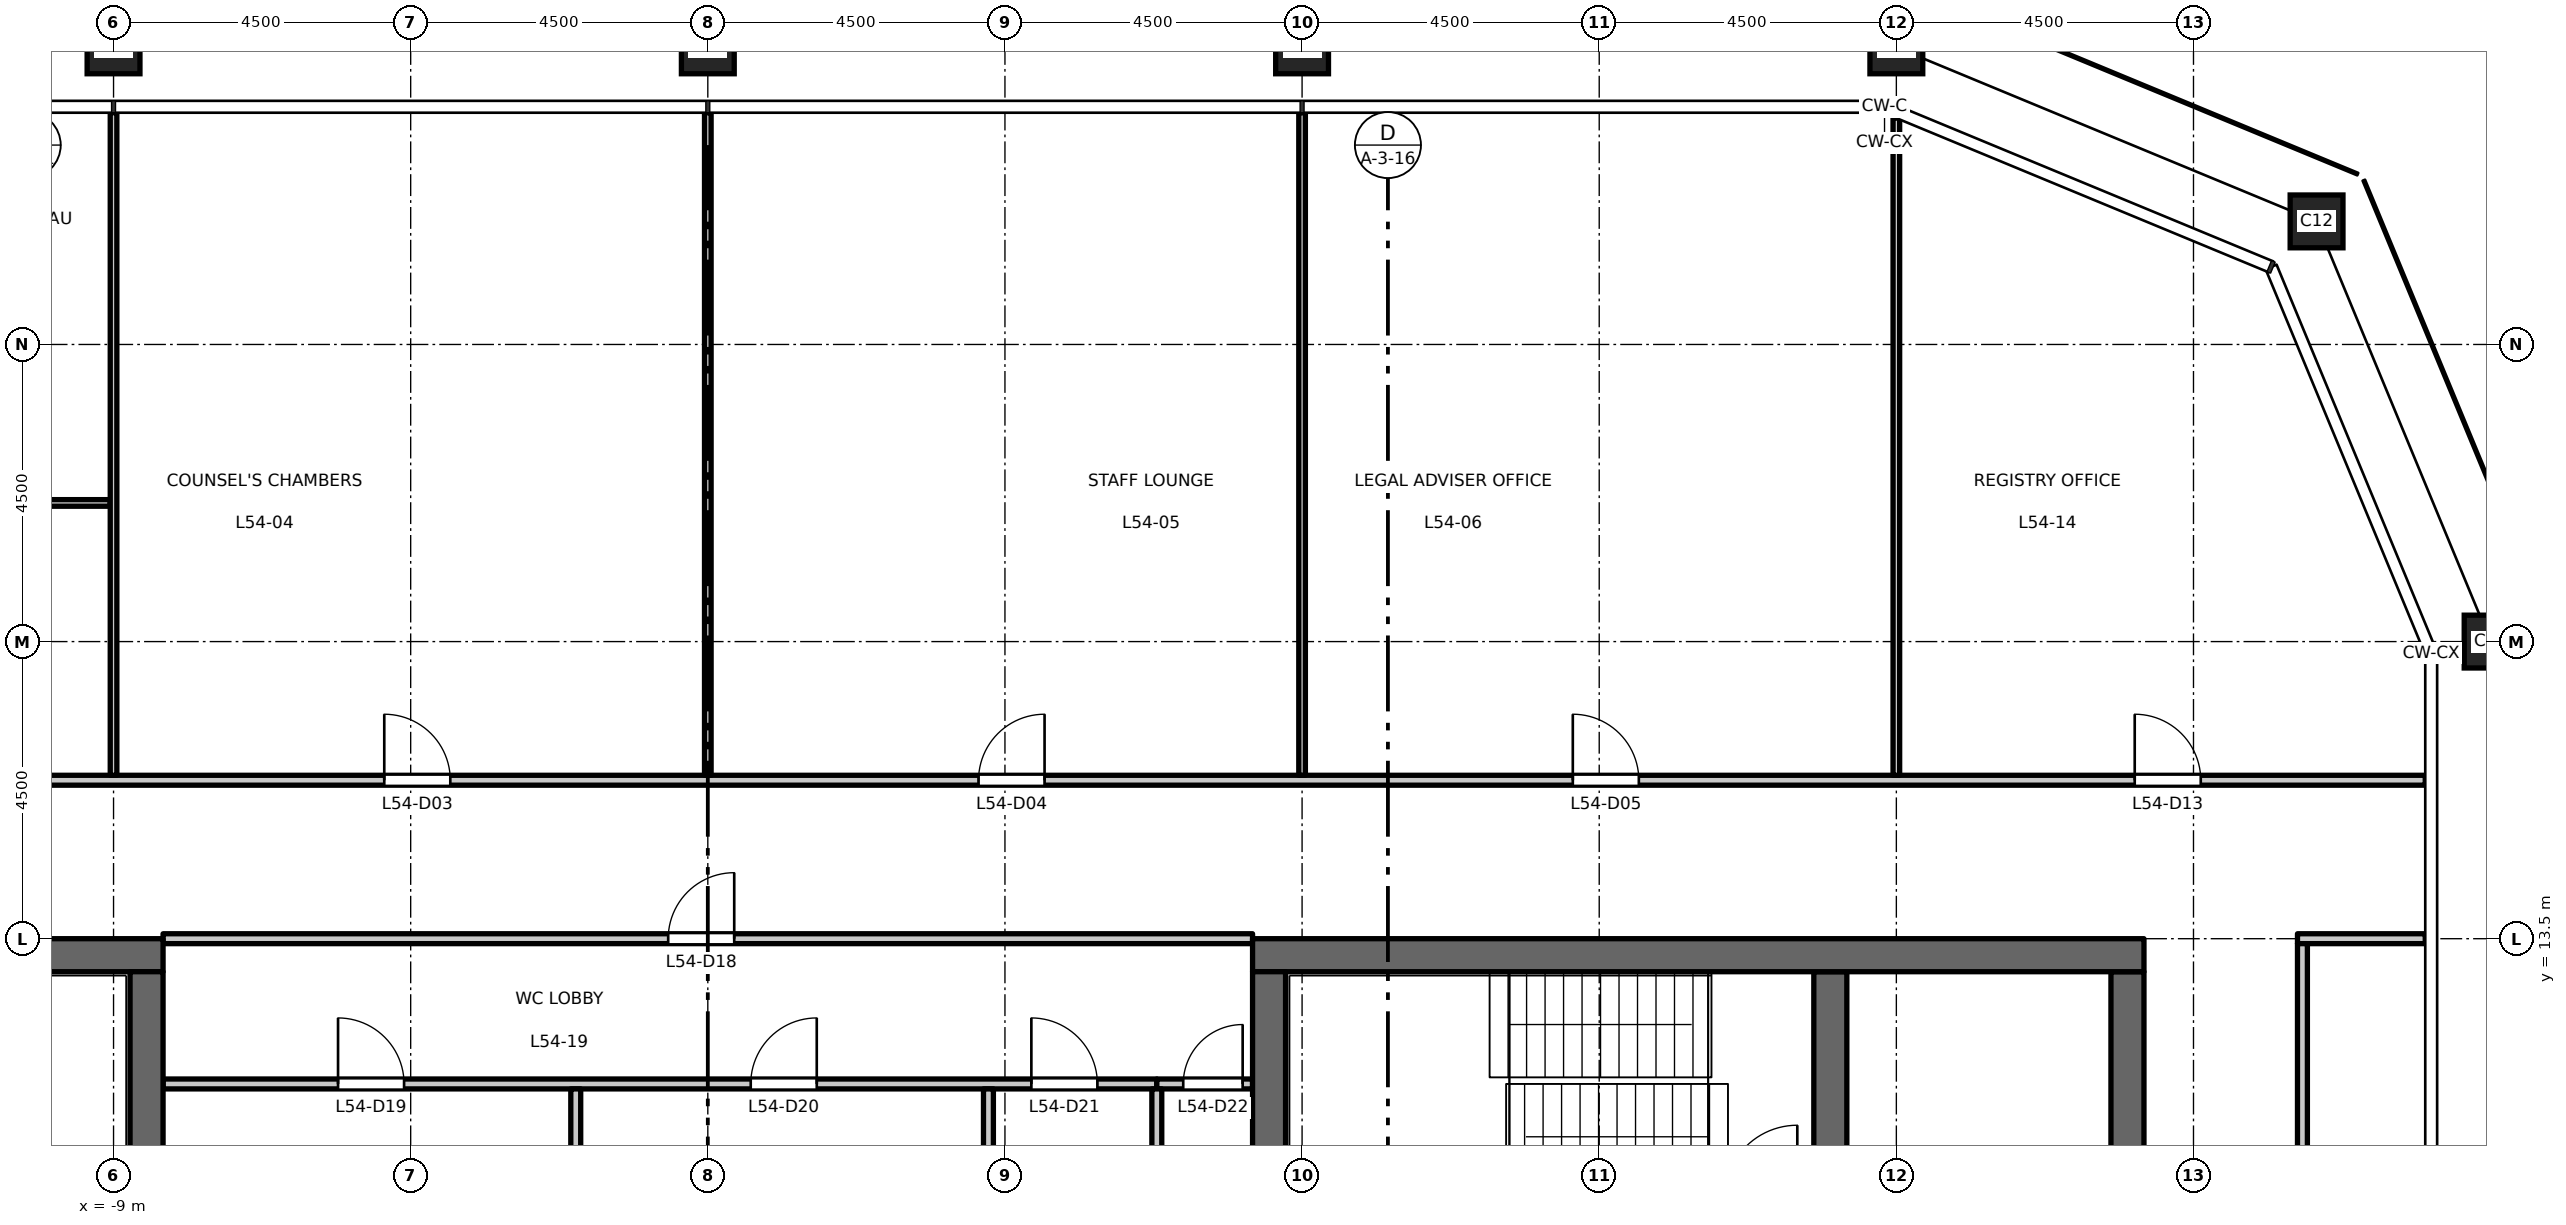
"""IFC4 building model, lengths in metres.
Left out: names, types, materials, properties, quantities, classifications, styles, units other than length and angle.
Written with IfcOpenShell. Run it as: python <this file> out.ifc"""

import sys

from ifc_helpers import new_model, si_unit, direction, frame, frame_2d, origin, origin_2d, place, context, subcontext, project, spatial, rectangle, hollow_rectangle, extrude, element, fill, save


model = new_model("IFC4")
c1 = context("Model", 3, precision=1e-05, world=origin(), true_north=direction((0.0, 1.0)))
c2 = subcontext(c1, "Body", "Model", "MODEL_VIEW")
j1 = project(units=[si_unit("LENGTHUNIT", "METRE"), si_unit("PLANEANGLEUNIT", "RADIAN")], contexts=[c1])
p1 = place(None, origin())
s1 = spatial("IfcSite", under=j1, at=p1, CompositionType="ELEMENT")
p2 = place(p1, origin())
s2 = spatial("IfcBuilding", under=s1, at=p2, CompositionType="ELEMENT")
p3 = place(p2, frame((0.0, 0.0, 251.2)))
s3 = spatial("IfcBuildingStorey", under=s2, at=p3, CompositionType="ELEMENT", Elevation=251.2)
for number, where, z_axis, x_axis in (
    (1, (27.0, 18.0, 0.0), (0.0, 0.0, 1.0), (1.0, 0.0, 0.0)),
    (2, (24.364, 24.364, 0.0), (0.0, 0.0, 1.0), (1.0, 0.0, 0.0)),
    (3, (18.0, 27.0, 0.0), (0.0, 0.0, 1.0), (1.0, 0.0, 0.0)),
    (4, (9.0, 27.0, 0.0), (0.0, 0.0, 1.0), (1.0, 0.0, 0.0)),
    (5, (0.0, 27.0, 0.0), (0.0, 0.0, 1.0), (1.0, 0.0, 0.0)),
    (6, (-9.0, 27.0, 0.0), (0.0, 0.0, 1.0), (1.0, 0.0, 0.0)),
):
    element("IfcColumn", number, at=place(p3, frame(where, z_axis=z_axis, x_axis=x_axis)), inside=s3, PredefinedType="COLUMN", context=c2, shape_type="SweptSolid", body=[
        extrude(hollow_rectangle(XDim=0.8, YDim=0.8, WallThickness=0.045, at=origin_2d()), origin(), (0.0, 0.0, 1.0), 4.5),
    ])
p4 = place(p3, frame((-8.25, 13.25, 0.0), z_axis=(0.0, 0.0, 1.0), x_axis=(-1.0, 0.0, 0.0)))
e7 = element("IfcWall", 7, at=p4, inside=s3, PredefinedType="SHEAR", context=c2, shape_type="SweptSolid", body=[
    extrude(rectangle(XDim=13.5, YDim=0.5, at=frame_2d((6.75, 0.0))), origin(), (0.0, 0.0, 1.0), 4.35),
])
p5 = place(p3, frame((-8.5, -13.0, 0.0), z_axis=(0.0, 0.0, 1.0), x_axis=(0.0, 1.0, 0.0)))
e8 = element("IfcWall", 8, at=p5, inside=s3, PredefinedType="SHEAR", context=c2, shape_type="SweptSolid", body=[
    extrude(rectangle(XDim=26.0, YDim=0.5, at=frame_2d((13.0, 0.0))), origin(), (0.0, 0.0, 1.0), 4.35),
])
p6 = place(p3, frame((21.5, -13.0, 0.0), z_axis=(0.0, 0.0, 1.0), x_axis=(0.0, 1.0, 0.0)))
e9 = element("IfcWall", 9, at=p6, inside=s3, PredefinedType="SHEAR", context=c2, shape_type="SweptSolid", body=[
    extrude(rectangle(XDim=26.0, YDim=0.5, at=frame_2d((13.0, 0.0))), origin(), (0.0, 0.0, 1.0), 4.35),
])
p7 = place(p6, frame((16.825, 0.0, 0.0)))
e10 = element("IfcOpeningElement", 10, at=p7, cuts=e9, PredefinedType="OPENING", context=c2, shape_type="SweptSolid", body=[
    extrude(rectangle(XDim=1.8, YDim=2.1, at=frame_2d((0.9, 1.05))), frame((0.0, 0.26, 0.0), z_axis=(0.0, -1.0, 0.0), x_axis=(1.0, 0.0, 0.0)), (0.0, 0.0, 1.0), 0.52),
])
p8 = place(p6, frame((7.375, 0.0, 0.0)))
e11 = element("IfcOpeningElement", 11, at=p8, cuts=e9, PredefinedType="OPENING", context=c2, shape_type="SweptSolid", body=[
    extrude(rectangle(XDim=1.8, YDim=2.1, at=frame_2d((0.9, 1.05))), frame((0.0, 0.26, 0.0), z_axis=(0.0, -1.0, 0.0), x_axis=(1.0, 0.0, 0.0)), (0.0, 0.0, 1.0), 0.52),
])
p9 = place(p6, frame((10.975, 0.0, 0.0)))
e12 = element("IfcOpeningElement", 12, at=p9, cuts=e9, PredefinedType="OPENING", context=c2, shape_type="SweptSolid", body=[
    extrude(rectangle(XDim=0.9, YDim=2.1, at=frame_2d((0.45, 1.05))), frame((0.0, 0.26, 0.0), z_axis=(0.0, -1.0, 0.0), x_axis=(1.0, 0.0, 0.0)), (0.0, 0.0, 1.0), 0.52),
])
p10 = place(p3, frame((17.0, 6.425, 0.0), z_axis=(0.0, 0.0, 1.0), x_axis=(0.0, 1.0, 0.0)))
e13 = element("IfcWall", 13, at=p10, inside=s3, PredefinedType="SHEAR", context=c2, shape_type="SweptSolid", body=[
    extrude(rectangle(XDim=6.575, YDim=0.5, at=frame_2d((3.288, 0.0))), origin(), (0.0, 0.0, 1.0), 4.35),
])
p11 = place(p3, frame((8.25, 13.25, 0.0), z_axis=(0.0, 0.0, 1.0), x_axis=(1.0, 0.0, 0.0)))
e14 = element("IfcWall", 14, at=p11, inside=s3, PredefinedType="SHEAR", context=c2, shape_type="SweptSolid", body=[
    extrude(rectangle(XDim=13.5, YDim=0.5, at=frame_2d((6.75, 0.0))), origin(), (0.0, 0.0, 1.0), 4.35),
])
p12 = place(p3, frame((8.5, -13.0, 0.0), z_axis=(0.0, 0.0, 1.0), x_axis=(0.0, 1.0, 0.0)))
e15 = element("IfcWall", 15, at=p12, inside=s3, PredefinedType="SHEAR", context=c2, shape_type="SweptSolid", body=[
    extrude(rectangle(XDim=26.0, YDim=0.5, at=frame_2d((13.0, 0.0))), origin(), (0.0, 0.0, 1.0), 4.35),
])
p13 = place(p3, frame((-8.25, 11.3, 0.0), z_axis=(0.0, 0.0, 1.0), x_axis=(1.0, 0.0, 0.0)))
e16 = element("IfcWall", 16, at=p13, inside=s3, PredefinedType="PARTITIONING", context=c2, shape_type="SweptSolid", body=[
    extrude(rectangle(XDim=15.05, YDim=0.15, at=frame_2d((7.525, 0.0))), origin(), (0.0, 0.0, 1.0), 4.35),
])
p14 = place(p13, frame((2.65, 0.0, 0.0)))
e17 = element("IfcOpeningElement", 17, at=p14, cuts=e16, PredefinedType="OPENING", context=c2, shape_type="SweptSolid", body=[
    extrude(rectangle(XDim=1.0, YDim=2.1, at=frame_2d((0.5, 1.05))), frame((0.0, 0.085, 0.0), z_axis=(0.0, -1.0, 0.0), x_axis=(1.0, 0.0, 0.0)), (0.0, 0.0, 1.0), 0.17),
])
p15 = place(p13, frame((8.9, 0.0, 0.0)))
e18 = element("IfcOpeningElement", 18, at=p15, cuts=e16, PredefinedType="OPENING", context=c2, shape_type="SweptSolid", body=[
    extrude(rectangle(XDim=1.0, YDim=2.1, at=frame_2d((0.5, 1.05))), frame((0.0, 0.085, 0.0), z_axis=(0.0, -1.0, 0.0), x_axis=(1.0, 0.0, 0.0)), (0.0, 0.0, 1.0), 0.17),
])
p16 = place(p13, frame((13.15, 0.0, 0.0)))
e19 = element("IfcOpeningElement", 19, at=p16, cuts=e16, PredefinedType="OPENING", context=c2, shape_type="SweptSolid", body=[
    extrude(rectangle(XDim=1.0, YDim=2.1, at=frame_2d((0.5, 1.05))), frame((0.0, 0.085, 0.0), z_axis=(0.0, -1.0, 0.0), x_axis=(1.0, 0.0, 0.0)), (0.0, 0.0, 1.0), 0.17),
])
p17 = place(p3, frame((6.8, 11.3, 0.0), z_axis=(0.0, 0.0, 1.0), x_axis=(1.0, 0.0, 0.0)))
e20 = element("IfcWall", 20, at=p17, inside=s3, PredefinedType="PARTITIONING", context=c2, shape_type="SweptSolid", body=[
    extrude(rectangle(XDim=1.45, YDim=0.15, at=frame_2d((0.725, 0.0))), origin(), (0.0, 0.0, 1.0), 4.35),
])
p18 = place(p17, frame((0.4, 0.0, 0.0)))
e21 = element("IfcOpeningElement", 21, at=p18, cuts=e20, PredefinedType="OPENING", context=c2, shape_type="SweptSolid", body=[
    extrude(rectangle(XDim=0.9, YDim=2.1, at=frame_2d((0.45, 1.05))), frame((0.0, 0.085, 0.0), z_axis=(0.0, -1.0, 0.0), x_axis=(1.0, 0.0, 0.0)), (0.0, 0.0, 1.0), 0.17),
])
p19 = place(p3, frame((-8.25, 13.5, 0.0), z_axis=(0.0, 0.0, 1.0), x_axis=(1.0, 0.0, 0.0)))
e22 = element("IfcWall", 22, at=p19, inside=s3, PredefinedType="PARTITIONING", context=c2, shape_type="SweptSolid", body=[
    extrude(rectangle(XDim=16.5, YDim=0.15, at=frame_2d((8.25, 0.0))), origin(), (0.0, 0.0, 1.0), 4.35),
])
p20 = place(p19, frame((7.65, 0.0, 0.0)))
e23 = element("IfcOpeningElement", 23, at=p20, cuts=e22, PredefinedType="OPENING", context=c2, shape_type="SweptSolid", body=[
    extrude(rectangle(XDim=1.0, YDim=2.1, at=frame_2d((0.5, 1.05))), frame((0.0, 0.085, 0.0), z_axis=(0.0, -1.0, 0.0), x_axis=(1.0, 0.0, 0.0)), (0.0, 0.0, 1.0), 0.17),
])
p21 = place(p3, frame((24.075, 13.5, 0.0), z_axis=(0.0, 0.0, 1.0), x_axis=(1.0, 0.0, 0.0)))
e24 = element("IfcWall", 24, at=p21, inside=s3, PredefinedType="PARTITIONING", context=c2, shape_type="SweptSolid", body=[
    extrude(rectangle(XDim=1.935, YDim=0.15, at=frame_2d((0.968, 0.0))), origin(), (0.0, 0.0, 1.0), 4.35),
])
p22 = place(p3, frame((-26.01, 15.9, 0.0), z_axis=(0.0, 0.0, 1.0), x_axis=(1.0, 0.0, 0.0)))
e25 = element("IfcWall", 25, at=p22, inside=s3, PredefinedType="PARTITIONING", context=c2, shape_type="SweptSolid", body=[
    extrude(rectangle(XDim=52.02, YDim=0.15, at=frame_2d((26.01, 0.0))), origin(), (0.0, 0.0, 1.0), 4.35),
])
p23 = place(p22, frame((12.11, 0.0, 0.0)))
e26 = element("IfcOpeningElement", 26, at=p23, cuts=e25, PredefinedType="OPENING", context=c2, shape_type="SweptSolid", body=[
    extrude(rectangle(XDim=1.0, YDim=2.1, at=frame_2d((0.5, 1.05))), frame((0.0, 0.085, 0.0), z_axis=(0.0, -1.0, 0.0), x_axis=(1.0, 0.0, 0.0)), (0.0, 0.0, 1.0), 0.17),
])
p24 = place(p22, frame((21.11, 0.0, 0.0)))
e27 = element("IfcOpeningElement", 27, at=p24, cuts=e25, PredefinedType="OPENING", context=c2, shape_type="SweptSolid", body=[
    extrude(rectangle(XDim=1.0, YDim=2.1, at=frame_2d((0.5, 1.05))), frame((0.0, 0.085, 0.0), z_axis=(0.0, -1.0, 0.0), x_axis=(1.0, 0.0, 0.0)), (0.0, 0.0, 1.0), 0.17),
])
p25 = place(p22, frame((30.11, 0.0, 0.0)))
e28 = element("IfcOpeningElement", 28, at=p25, cuts=e25, PredefinedType="OPENING", context=c2, shape_type="SweptSolid", body=[
    extrude(rectangle(XDim=1.0, YDim=2.1, at=frame_2d((0.5, 1.05))), frame((0.0, 0.085, 0.0), z_axis=(0.0, -1.0, 0.0), x_axis=(1.0, 0.0, 0.0)), (0.0, 0.0, 1.0), 0.17),
])
p26 = place(p22, frame((39.11, 0.0, 0.0)))
e29 = element("IfcOpeningElement", 29, at=p26, cuts=e25, PredefinedType="OPENING", context=c2, shape_type="SweptSolid", body=[
    extrude(rectangle(XDim=1.0, YDim=2.1, at=frame_2d((0.5, 1.05))), frame((0.0, 0.085, 0.0), z_axis=(0.0, -1.0, 0.0), x_axis=(1.0, 0.0, 0.0)), (0.0, 0.0, 1.0), 0.17),
])
p27 = place(p22, frame((3.61, 0.0, 0.0)))
e30 = element("IfcOpeningElement", 30, at=p27, cuts=e25, PredefinedType="OPENING", context=c2, shape_type="SweptSolid", body=[
    extrude(rectangle(XDim=1.0, YDim=2.1, at=frame_2d((0.5, 1.05))), frame((0.0, 0.085, 0.0), z_axis=(0.0, -1.0, 0.0), x_axis=(1.0, 0.0, 0.0)), (0.0, 0.0, 1.0), 0.17),
])
p28 = place(p22, frame((47.62, 0.0, 0.0)))
e31 = element("IfcOpeningElement", 31, at=p28, cuts=e25, PredefinedType="OPENING", context=c2, shape_type="SweptSolid", body=[
    extrude(rectangle(XDim=1.0, YDim=2.1, at=frame_2d((0.5, 1.05))), frame((0.0, 0.085, 0.0), z_axis=(0.0, -1.0, 0.0), x_axis=(1.0, 0.0, 0.0)), (0.0, 0.0, 1.0), 0.17),
])
p29 = place(p3, frame((-25.058, 20.1, 0.0), z_axis=(0.0, 0.0, 1.0), x_axis=(1.0, 0.0, 0.0)))
e32 = element("IfcWall", 32, at=p29, inside=s3, PredefinedType="PARTITIONING", context=c2, shape_type="SweptSolid", body=[
    extrude(rectangle(XDim=16.008, YDim=0.1, at=frame_2d((8.004, 0.0))), origin(), (0.0, 0.0, 1.0), 4.35),
])
p30 = place(p29, frame((11.158, 0.0, 0.0)))
e33 = element("IfcOpeningElement", 33, at=p30, cuts=e32, PredefinedType="OPENING", context=c2, shape_type="SweptSolid", body=[
    extrude(rectangle(XDim=1.0, YDim=2.1, at=frame_2d((0.5, 1.05))), frame((0.0, 0.06, 0.0), z_axis=(0.0, -1.0, 0.0), x_axis=(1.0, 0.0, 0.0)), (0.0, 0.0, 1.0), 0.12),
])
p31 = place(p29, frame((2.908, 0.0, 0.0)))
e34 = element("IfcOpeningElement", 34, at=p31, cuts=e32, PredefinedType="OPENING", context=c2, shape_type="SweptSolid", body=[
    extrude(rectangle(XDim=1.0, YDim=2.1, at=frame_2d((0.5, 1.05))), frame((0.0, 0.06, 0.0), z_axis=(0.0, -1.0, 0.0), x_axis=(1.0, 0.0, 0.0)), (0.0, 0.0, 1.0), 0.12),
])
p32 = place(p3, frame((-9.0, 15.975, 0.0), z_axis=(0.0, 0.0, 1.0), x_axis=(0.0, 1.0, 0.0)))
e35 = element("IfcWall", 35, at=p32, inside=s3, PredefinedType="PARTITIONING", context=c2, shape_type="SweptSolid", body=[
    extrude(rectangle(XDim=10.035, YDim=0.1, at=frame_2d((5.018, 0.0))), origin(), (0.0, 0.0, 1.0), 3.65),
])
p33 = place(p3, frame((-2.0, 8.37, 0.0), z_axis=(0.0, 0.0, 1.0), x_axis=(0.0, 1.0, 0.0)))
e36 = element("IfcWall", 36, at=p33, inside=s3, PredefinedType="PARTITIONING", context=c2, shape_type="SweptSolid", body=[
    extrude(rectangle(XDim=2.855, YDim=0.15, at=frame_2d((1.427, 0.0))), origin(), (0.0, 0.0, 1.0), 4.35),
])
p34 = place(p3, frame((0.0, 15.975, 0.0), z_axis=(0.0, 0.0, 1.0), x_axis=(0.0, 1.0, 0.0)))
e37 = element("IfcWall", 37, at=p34, inside=s3, PredefinedType="PARTITIONING", context=c2, shape_type="SweptSolid", body=[
    extrude(rectangle(XDim=10.035, YDim=0.1, at=frame_2d((5.018, 0.0))), origin(), (0.0, 0.0, 1.0), 3.55),
])
p35 = place(p3, frame((4.25, 8.37, 0.0), z_axis=(0.0, 0.0, 1.0), x_axis=(0.0, 1.0, 0.0)))
e38 = element("IfcWall", 38, at=p35, inside=s3, PredefinedType="PARTITIONING", context=c2, shape_type="SweptSolid", body=[
    extrude(rectangle(XDim=2.855, YDim=0.15, at=frame_2d((1.427, 0.0))), origin(), (0.0, 0.0, 1.0), 4.35),
])
p36 = place(p3, frame((6.8, 8.069, 0.0), z_axis=(0.0, 0.0, 1.0), x_axis=(0.0, 1.0, 0.0)))
e39 = element("IfcWall", 39, at=p36, inside=s3, PredefinedType="PARTITIONING", context=c2, shape_type="SweptSolid", body=[
    extrude(rectangle(XDim=3.156, YDim=0.15, at=frame_2d((1.578, 0.0))), origin(), (0.0, 0.0, 1.0), 4.35),
])
p37 = place(p3, frame((9.0, 15.975, 0.0), z_axis=(0.0, 0.0, 1.0), x_axis=(0.0, 1.0, 0.0)))
e40 = element("IfcWall", 40, at=p37, inside=s3, PredefinedType="PARTITIONING", context=c2, shape_type="SweptSolid", body=[
    extrude(rectangle(XDim=10.035, YDim=0.1, at=frame_2d((5.018, 0.0))), origin(), (0.0, 0.0, 1.0), 3.65),
])
p38 = place(p3, frame((18.0, 15.975, 0.0), z_axis=(0.0, 0.0, 1.0), x_axis=(0.0, 1.0, 0.0)))
e41 = element("IfcWall", 41, at=p38, inside=s3, PredefinedType="PARTITIONING", context=c2, shape_type="SweptSolid", body=[
    extrude(rectangle(XDim=9.953, YDim=0.1, at=frame_2d((4.977, 0.0))), origin(), (0.0, 0.0, 1.0), 3.65),
])
p39 = place(p3, frame((24.15, -13.425, 0.0), z_axis=(0.0, 0.0, 1.0), x_axis=(0.0, 1.0, 0.0)))
e42 = element("IfcWall", 42, at=p39, inside=s3, PredefinedType="PARTITIONING", context=c2, shape_type="SweptSolid", body=[
    extrude(rectangle(XDim=26.85, YDim=0.15, at=frame_2d((13.425, 0.0))), origin(), (0.0, 0.0, 1.0), 4.35),
])
p40 = place(p39, frame((12.825, 0.0, 0.0)))
e43 = element("IfcOpeningElement", 43, at=p40, cuts=e42, PredefinedType="OPENING", context=c2, shape_type="SweptSolid", body=[
    extrude(rectangle(XDim=1.0, YDim=2.1, at=frame_2d((0.5, 1.05))), frame((0.0, 0.085, 0.0), z_axis=(0.0, -1.0, 0.0), x_axis=(1.0, 0.0, 0.0)), (0.0, 0.0, 1.0), 0.17),
])
p41 = place(p24, origin())
e44 = element("IfcDoor", 44, at=p41, inside=s3, OperationType="SINGLE_SWING_LEFT", PredefinedType="DOOR", context=c2, shape_type="SweptSolid", body=[
    extrude(rectangle(XDim=1.0, YDim=2.1, at=frame_2d((0.5, 1.05))), frame((0.0, 0.025, 0.0), z_axis=(0.0, -1.0, 0.0), x_axis=(1.0, 0.0, 0.0)), (0.0, 0.0, 1.0), 0.05),
])
fill(e27, e44)
p42 = place(p25, origin())
e45 = element("IfcDoor", 45, at=p42, inside=s3, OperationType="SINGLE_SWING_RIGHT", PredefinedType="DOOR", context=c2, shape_type="SweptSolid", body=[
    extrude(rectangle(XDim=1.0, YDim=2.1, at=frame_2d((0.5, 1.05))), frame((0.0, 0.025, 0.0), z_axis=(0.0, -1.0, 0.0), x_axis=(1.0, 0.0, 0.0)), (0.0, 0.0, 1.0), 0.05),
])
fill(e28, e45)
p43 = place(p26, origin())
e46 = element("IfcDoor", 46, at=p43, inside=s3, OperationType="SINGLE_SWING_LEFT", PredefinedType="DOOR", context=c2, shape_type="SweptSolid", body=[
    extrude(rectangle(XDim=1.0, YDim=2.1, at=frame_2d((0.5, 1.05))), frame((0.0, 0.025, 0.0), z_axis=(0.0, -1.0, 0.0), x_axis=(1.0, 0.0, 0.0)), (0.0, 0.0, 1.0), 0.05),
])
fill(e29, e46)
p44 = place(p28, origin())
e47 = element("IfcDoor", 47, at=p44, inside=s3, OperationType="SINGLE_SWING_LEFT", PredefinedType="DOOR", context=c2, shape_type="SweptSolid", body=[
    extrude(rectangle(XDim=1.0, YDim=2.1, at=frame_2d((0.5, 1.05))), frame((0.0, 0.025, 0.0), z_axis=(0.0, -1.0, 0.0), x_axis=(1.0, 0.0, 0.0)), (0.0, 0.0, 1.0), 0.05),
])
fill(e31, e47)
p45 = place(p20, origin())
e48 = element("IfcDoor", 48, at=p45, inside=s3, OperationType="SINGLE_SWING_RIGHT", PredefinedType="DOOR", context=c2, shape_type="SweptSolid", body=[
    extrude(rectangle(XDim=1.0, YDim=2.1, at=frame_2d((0.5, 1.05))), frame((0.0, 0.025, 0.0), z_axis=(0.0, -1.0, 0.0), x_axis=(1.0, 0.0, 0.0)), (0.0, 0.0, 1.0), 0.05),
])
fill(e23, e48)
p46 = place(p14, origin())
e49 = element("IfcDoor", 49, at=p46, inside=s3, OperationType="SINGLE_SWING_LEFT", PredefinedType="DOOR", context=c2, shape_type="SweptSolid", body=[
    extrude(rectangle(XDim=1.0, YDim=2.1, at=frame_2d((0.5, 1.05))), frame((0.0, 0.025, 0.0), z_axis=(0.0, -1.0, 0.0), x_axis=(1.0, 0.0, 0.0)), (0.0, 0.0, 1.0), 0.05),
])
fill(e17, e49)
p47 = place(p15, origin())
e50 = element("IfcDoor", 50, at=p47, inside=s3, OperationType="SINGLE_SWING_RIGHT", PredefinedType="DOOR", context=c2, shape_type="SweptSolid", body=[
    extrude(rectangle(XDim=1.0, YDim=2.1, at=frame_2d((0.5, 1.05))), frame((0.0, 0.025, 0.0), z_axis=(0.0, -1.0, 0.0), x_axis=(1.0, 0.0, 0.0)), (0.0, 0.0, 1.0), 0.05),
])
fill(e18, e50)
p48 = place(p16, origin())
e51 = element("IfcDoor", 51, at=p48, inside=s3, OperationType="SINGLE_SWING_LEFT", PredefinedType="DOOR", context=c2, shape_type="SweptSolid", body=[
    extrude(rectangle(XDim=1.0, YDim=2.1, at=frame_2d((0.5, 1.05))), frame((0.0, 0.025, 0.0), z_axis=(0.0, -1.0, 0.0), x_axis=(1.0, 0.0, 0.0)), (0.0, 0.0, 1.0), 0.05),
])
fill(e19, e51)
p49 = place(p18, origin())
e52 = element("IfcDoor", 52, at=p49, inside=s3, OperationType="SINGLE_SWING_RIGHT", PredefinedType="DOOR", context=c2, shape_type="SweptSolid", body=[
    extrude(rectangle(XDim=0.9, YDim=2.1, at=frame_2d((0.45, 1.05))), frame((0.0, 0.025, 0.0), z_axis=(0.0, -1.0, 0.0), x_axis=(1.0, 0.0, 0.0)), (0.0, 0.0, 1.0), 0.05),
])
fill(e21, e52)
save(model, sys.argv[1])
